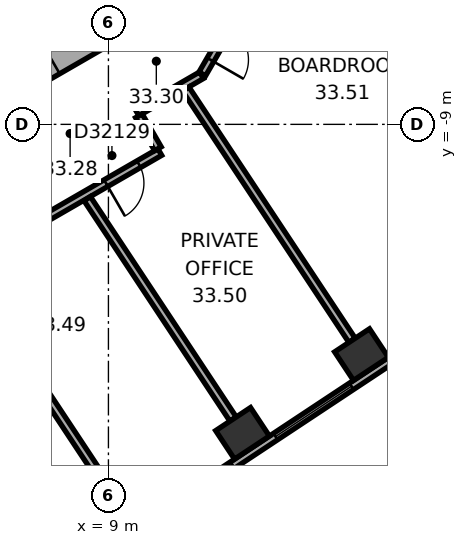
"""IFC4 building model, lengths in metres.
Left out: names, types, materials, properties, quantities, classifications, styles, units other than length and angle.
Written with IfcOpenShell. Run it as: python <this file> out.ifc"""

import sys

from ifc_helpers import new_model, si_unit, direction, frame, frame_2d, origin, origin_2d, place, context, subcontext, project, spatial, rectangle, extrude, element, fill, save


model = new_model("IFC4")
c1 = context("Model", 3, precision=1e-05, world=origin(), true_north=direction((0.0, 1.0)))
c2 = subcontext(c1, "Body", "Model", "MODEL_VIEW")
j1 = project(units=[si_unit("LENGTHUNIT", "METRE"), si_unit("PLANEANGLEUNIT", "RADIAN")], contexts=[c1])
p1 = place(None, origin())
s1 = spatial("IfcSite", under=j1, at=p1, CompositionType="ELEMENT")
p2 = place(p1, origin())
s2 = spatial("IfcBuilding", under=s1, at=p2, CompositionType="ELEMENT")
p3 = place(p2, frame((0.0, 0.0, 135.5)))
s3 = spatial("IfcBuildingStorey", under=s2, at=p3, CompositionType="ELEMENT", Elevation=135.5)
for number, where, z_axis, x_axis in (
    (1, (12.529, -17.13, 0.0), (0.0, 0.0, 1.0), (0.834, 0.552, 0.0)),
    (2, (15.659, -15.058, 0.0), (0.0, 0.0, 1.0), (0.834, 0.552, 0.0)),
):
    element("IfcColumn", number, at=place(p3, frame(where, z_axis=z_axis, x_axis=x_axis)), inside=s3, PredefinedType="COLUMN", context=c2, shape_type="SweptSolid", body=[
        extrude(rectangle(XDim=1.1, YDim=0.9, at=origin_2d()), origin(), (0.0, 0.0, 1.0), 3.7),
    ])
p4 = place(p3, frame((-0.25, -11.691, 0.0), z_axis=(0.0, 0.0, 1.0), x_axis=(0.866022616891, 0.50000482701, 0.0)))
e3 = element("IfcWall", 3, at=p4, inside=s3, PredefinedType="SHEAR", context=c2, shape_type="SweptSolid", body=[
    extrude(rectangle(XDim=12.125, YDim=1.0, at=frame_2d((6.062, 0.0))), origin(), (0.0, 0.0, 1.0), 3.7),
])
p5 = place(p4, frame((7.812, 0.0, 0.0)))
e4 = element("IfcOpeningElement", 4, at=p5, cuts=e3, PredefinedType="OPENING", context=c2, shape_type="SweptSolid", body=[
    extrude(rectangle(XDim=1.1, YDim=2.1, at=frame_2d((0.55, 1.05))), frame((0.0, 0.51, 0.0), z_axis=(0.0, -1.0, 0.0), x_axis=(1.0, 0.0, 0.0)), (0.0, 0.0, 1.0), 1.02),
])
p6 = place(p3, frame((2.911, -24.156, 0.0), z_axis=(0.0, 0.0, 1.0), x_axis=(0.833882163564, 0.551942512668, 0.0)))
e5 = element("IfcWall", 5, at=p6, inside=s3, PredefinedType="STANDARD", context=c2, shape_type="SweptSolid", body=[
    extrude(rectangle(XDim=20.044, YDim=0.2, at=frame_2d((10.022, 0.0))), origin(), (0.0, 0.0, 1.0), 3.7),
])
p7 = place(p6, frame((1.313, 0.0, 0.9)))
e6 = element("IfcOpeningElement", 6, at=p7, cuts=e5, PredefinedType="OPENING", context=c2, shape_type="SweptSolid", body=[
    extrude(rectangle(XDim=2.4, YDim=2.0, at=frame_2d((1.2, 1.0))), frame((0.0, 0.11, 0.0), z_axis=(0.0, -1.0, 0.0), x_axis=(1.0, 0.0, 0.0)), (0.0, 0.0, 1.0), 0.22),
])
p8 = place(p6, frame((5.067, 0.0, 0.9)))
e7 = element("IfcOpeningElement", 7, at=p8, cuts=e5, PredefinedType="OPENING", context=c2, shape_type="SweptSolid", body=[
    extrude(rectangle(XDim=2.4, YDim=2.0, at=frame_2d((1.2, 1.0))), frame((0.0, 0.11, 0.0), z_axis=(0.0, -1.0, 0.0), x_axis=(1.0, 0.0, 0.0)), (0.0, 0.0, 1.0), 0.22),
])
p9 = place(p6, frame((8.821, 0.0, 0.9)))
e8 = element("IfcOpeningElement", 8, at=p9, cuts=e5, PredefinedType="OPENING", context=c2, shape_type="SweptSolid", body=[
    extrude(rectangle(XDim=2.4, YDim=2.0, at=frame_2d((1.2, 1.0))), frame((0.0, 0.11, 0.0), z_axis=(0.0, -1.0, 0.0), x_axis=(1.0, 0.0, 0.0)), (0.0, 0.0, 1.0), 0.22),
])
p10 = place(p6, frame((12.575, 0.0, 0.9)))
e9 = element("IfcOpeningElement", 9, at=p10, cuts=e5, PredefinedType="OPENING", context=c2, shape_type="SweptSolid", body=[
    extrude(rectangle(XDim=2.4, YDim=2.0, at=frame_2d((1.2, 1.0))), frame((0.0, 0.11, 0.0), z_axis=(0.0, -1.0, 0.0), x_axis=(1.0, 0.0, 0.0)), (0.0, 0.0, 1.0), 0.22),
])
p11 = place(p6, frame((16.329, 0.0, 0.9)))
e10 = element("IfcOpeningElement", 10, at=p11, cuts=e5, PredefinedType="OPENING", context=c2, shape_type="SweptSolid", body=[
    extrude(rectangle(XDim=2.4, YDim=2.0, at=frame_2d((1.2, 1.0))), frame((0.0, 0.11, 0.0), z_axis=(0.0, -1.0, 0.0), x_axis=(1.0, 0.0, 0.0)), (0.0, 0.0, 1.0), 0.22),
])
p12 = place(p3, frame((7.319, -11.479, 0.0), z_axis=(0.0, 0.0, 1.0), x_axis=(0.866038154057, 0.49997791523, 0.0)))
e11 = element("IfcWall", 11, at=p12, inside=s3, PredefinedType="PARTITIONING", context=c2, shape_type="SweptSolid", body=[
    extrude(rectangle(XDim=3.502, YDim=0.2, at=frame_2d((1.751, 0.0))), origin(), (0.0, 0.0, 1.0), 3.35),
])
p13 = place(p12, frame((1.865, 0.0, 0.0)))
e12 = element("IfcOpeningElement", 12, at=p13, cuts=e11, PredefinedType="OPENING", context=c2, shape_type="SweptSolid", body=[
    extrude(rectangle(XDim=1.0, YDim=2.1, at=frame_2d((0.5, 1.05))), frame((0.0, 0.11, 0.0), z_axis=(0.0, -1.0, 0.0), x_axis=(1.0, 0.0, 0.0)), (0.0, 0.0, 1.0), 0.22),
])
p14 = place(p3, frame((9.15, -18.827, 0.0), z_axis=(0.0, 0.0, 1.0), x_axis=(-0.551942527453, 0.833882153777, 0.0)))
e13 = element("IfcWall", 13, at=p14, inside=s3, PredefinedType="PARTITIONING", context=c2, shape_type="SweptSolid", body=[
    extrude(rectangle(XDim=8.386, YDim=0.2, at=frame_2d((4.193, 0.0))), origin(), (0.0, 0.0, 1.0), 2.55),
])
p15 = place(p3, frame((9.752, -8.688, 0.0), z_axis=(0.0, 0.0, 1.0), x_axis=(0.865974105138, 0.500088841337, 0.0)))
e14 = element("IfcWall", 14, at=p15, inside=s3, PredefinedType="PARTITIONING", context=c2, shape_type="SweptSolid", body=[
    extrude(rectangle(XDim=1.961, YDim=0.2, at=frame_2d((0.98, 0.0))), origin(), (0.0, 0.0, 1.0), 3.35),
])
p16 = place(p3, frame((10.302, -9.642, 0.0), z_axis=(0.0, 0.0, 1.0), x_axis=(-0.500074377092, 0.865982457891, 0.0)))
e15 = element("IfcWall", 15, at=p16, inside=s3, PredefinedType="PARTITIONING", context=c2, shape_type="SweptSolid", body=[
    extrude(rectangle(XDim=1.001, YDim=0.2, at=frame_2d((0.5, 0.0))), origin(), (0.0, 0.0, 1.0), 3.35),
])
p17 = place(p3, frame((11.47, -7.673, 0.0), z_axis=(0.0, 0.0, 1.0), x_axis=(0.499964847546, 0.866045698112, 0.0)))
e16 = element("IfcWall", 16, at=p17, inside=s3, PredefinedType="PARTITIONING", context=c2, shape_type="SweptSolid", body=[
    extrude(rectangle(XDim=1.86, YDim=0.2, at=frame_2d((0.93, 0.0))), origin(), (0.0, 0.0, 1.0), 3.35),
])
p18 = place(p17, frame((0.43, 0.0, 0.0)))
e17 = element("IfcOpeningElement", 17, at=p18, cuts=e16, PredefinedType="OPENING", context=c2, shape_type="SweptSolid", body=[
    extrude(rectangle(XDim=1.0, YDim=2.1, at=frame_2d((0.5, 1.05))), frame((0.0, 0.11, 0.0), z_axis=(0.0, -1.0, 0.0), x_axis=(1.0, 0.0, 0.0)), (0.0, 0.0, 1.0), 0.22),
])
p19 = place(p3, frame((12.281, -16.755, 0.0), z_axis=(0.0, 0.0, 1.0), x_axis=(-0.551925794663, 0.833893228888, 0.0)))
e18 = element("IfcWall", 18, at=p19, inside=s3, PredefinedType="PARTITIONING", context=c2, shape_type="SweptSolid", body=[
    extrude(rectangle(XDim=6.953, YDim=0.2, at=frame_2d((3.476, 0.0))), origin(), (0.0, 0.0, 1.0), 3.35),
])
p20 = place(p3, frame((15.411, -14.683, 0.0), z_axis=(0.0, 0.0, 1.0), x_axis=(-0.551932106251, 0.833889051427, 0.0)))
e19 = element("IfcWall", 19, at=p20, inside=s3, PredefinedType="PARTITIONING", context=c2, shape_type="SweptSolid", body=[
    extrude(rectangle(XDim=7.926, YDim=0.2, at=frame_2d((3.963, 0.0))), origin(), (0.0, 0.0, 1.0), 2.55),
])
p21 = place(p9, origin())
e20 = element("IfcWindow", 20, at=p21, inside=s3, PartitioningType="SINGLE_PANEL", PredefinedType="WINDOW", context=c2, shape_type="SweptSolid", body=[
    extrude(rectangle(XDim=2.4, YDim=2.0, at=frame_2d((1.2, 1.0))), frame((0.0, 0.03, 0.0), z_axis=(0.0, -1.0, 0.0), x_axis=(1.0, 0.0, 0.0)), (0.0, 0.0, 1.0), 0.06),
])
fill(e8, e20)
p22 = place(p10, origin())
e21 = element("IfcWindow", 21, at=p22, inside=s3, PartitioningType="SINGLE_PANEL", PredefinedType="WINDOW", context=c2, shape_type="SweptSolid", body=[
    extrude(rectangle(XDim=2.4, YDim=2.0, at=frame_2d((1.2, 1.0))), frame((0.0, 0.03, 0.0), z_axis=(0.0, -1.0, 0.0), x_axis=(1.0, 0.0, 0.0)), (0.0, 0.0, 1.0), 0.06),
])
fill(e9, e21)
p23 = place(p13, origin())
e22 = element("IfcDoor", 22, at=p23, inside=s3, OperationType="SINGLE_SWING_LEFT", PredefinedType="DOOR", context=c2, shape_type="SweptSolid", body=[
    extrude(rectangle(XDim=1.0, YDim=2.1, at=frame_2d((0.5, 1.05))), frame((0.0, 0.025, 0.0), z_axis=(0.0, -1.0, 0.0), x_axis=(1.0, 0.0, 0.0)), (0.0, 0.0, 1.0), 0.05),
])
fill(e12, e22)
p24 = place(p18, origin())
e23 = element("IfcDoor", 23, at=p24, inside=s3, OperationType="SINGLE_SWING_LEFT", PredefinedType="DOOR", context=c2, shape_type="SweptSolid", body=[
    extrude(rectangle(XDim=1.0, YDim=2.1, at=frame_2d((0.5, 1.05))), frame((0.0, 0.025, 0.0), z_axis=(0.0, -1.0, 0.0), x_axis=(1.0, 0.0, 0.0)), (0.0, 0.0, 1.0), 0.05),
])
fill(e17, e23)
save(model, sys.argv[1])
